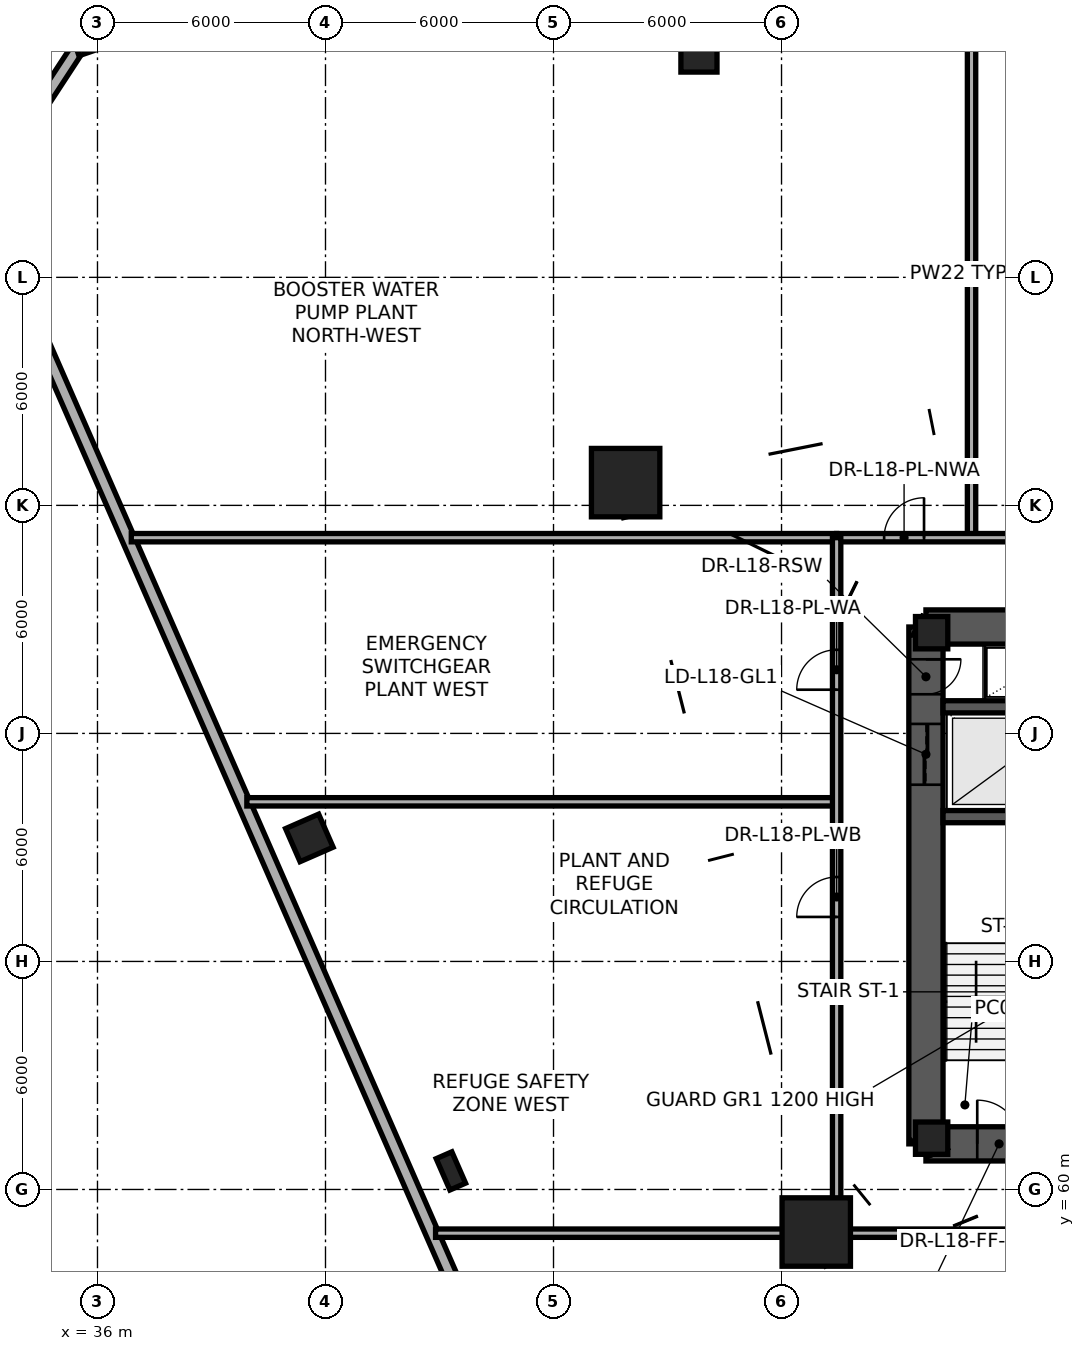
"""IFC4 building model, lengths in metres.
Left out: names, types, materials, properties, quantities, classifications, styles, units other than length and angle.
Written with IfcOpenShell. Run it as: python <this file> out.ifc"""

import sys

from ifc_helpers import new_model, si_unit, direction, frame, frame_2d, origin, origin_2d, place, context, subcontext, project, spatial, rectangle, extrude, element, fill, save


model = new_model("IFC4")
c1 = context("Model", 3, precision=1e-05, world=origin(), true_north=direction((0.0, 1.0)))
c2 = subcontext(c1, "Body", "Model", "MODEL_VIEW")
j1 = project(units=[si_unit("LENGTHUNIT", "METRE"), si_unit("PLANEANGLEUNIT", "RADIAN")], contexts=[c1])
p1 = place(None, origin())
s1 = spatial("IfcSite", under=j1, at=p1, CompositionType="ELEMENT")
p2 = place(p1, origin())
s2 = spatial("IfcBuilding", under=s1, at=p2, CompositionType="ELEMENT")
p3 = place(p2, frame((0.0, 0.0, 70.8)))
s3 = spatial("IfcBuildingStorey", under=s2, at=p3, CompositionType="ELEMENT", Elevation=70.8)
p4 = place(p3, frame((57.8, 61.2, 0.0), z_axis=(0.0, 0.0, 1.0), x_axis=(1.0, 0.0, 0.0)))
e1 = element("IfcWall", 1, at=p4, inside=s3, PredefinedType="SHEAR", context=c2, shape_type="SweptSolid", body=[
    extrude(rectangle(XDim=16.4, YDim=0.9, at=frame_2d((8.2, 0.0))), origin(), (0.0, 0.0, 1.0), 4.2),
])
p5 = place(p4, frame((1.35, 0.0, 0.0)))
e2 = element("IfcOpeningElement", 2, at=p5, cuts=e1, PredefinedType="OPENING", context=c2, shape_type="SweptSolid", body=[
    extrude(rectangle(XDim=1.15, YDim=2.15, at=frame_2d((0.575, 1.075))), frame((0.0, 0.46, 0.0), z_axis=(0.0, -1.0, 0.0), x_axis=(1.0, 0.0, 0.0)), (0.0, 0.0, 1.0), 0.92),
])
p6 = place(p4, frame((6.1, 0.0, 0.0)))
e3 = element("IfcOpeningElement", 3, at=p6, cuts=e1, PredefinedType="OPENING", context=c2, shape_type="SweptSolid", body=[
    extrude(rectangle(XDim=1.6, YDim=2.15, at=frame_2d((0.8, 1.075))), frame((0.0, 0.46, 0.0), z_axis=(0.0, -1.0, 0.0), x_axis=(1.0, 0.0, 0.0)), (0.0, 0.0, 1.0), 0.92),
])
p7 = place(p4, frame((13.55, 0.0, 0.0)))
e4 = element("IfcOpeningElement", 4, at=p7, cuts=e1, PredefinedType="OPENING", context=c2, shape_type="SweptSolid", body=[
    extrude(rectangle(XDim=1.15, YDim=2.15, at=frame_2d((0.575, 1.075))), frame((0.0, 0.46, 0.0), z_axis=(0.0, -1.0, 0.0), x_axis=(1.0, 0.0, 0.0)), (0.0, 0.0, 1.0), 0.92),
])
p8 = place(p3, frame((64.85, 74.8, 0.0), z_axis=(0.0, 0.0, 1.0), x_axis=(-1.0, 0.0, 0.0)))
e5 = element("IfcWall", 5, at=p8, inside=s3, PredefinedType="SHEAR", context=c2, shape_type="SweptSolid", body=[
    extrude(rectangle(XDim=7.05, YDim=0.9, at=frame_2d((3.525, 0.0))), origin(), (0.0, 0.0, 1.0), 4.2),
])
p9 = place(p3, frame((57.8, 74.8, 0.0), z_axis=(0.0, 0.0, 1.0), x_axis=(0.0, -1.0, 0.0)))
e6 = element("IfcWall", 6, at=p9, inside=s3, PredefinedType="SHEAR", context=c2, shape_type="SweptSolid", body=[
    extrude(rectangle(XDim=13.6, YDim=0.9, at=frame_2d((6.8, 0.0))), origin(), (0.0, 0.0, 1.0), 4.2),
])
p10 = place(p9, frame((0.85, 0.0, 0.0)))
e7 = element("IfcOpeningElement", 7, at=p10, cuts=e6, PredefinedType="OPENING", context=c2, shape_type="SweptSolid", body=[
    extrude(rectangle(XDim=0.92, YDim=2.05, at=frame_2d((0.46, 1.025))), frame((0.0, 0.46, 0.0), z_axis=(0.0, -1.0, 0.0), x_axis=(1.0, 0.0, 0.0)), (0.0, 0.0, 1.0), 0.92),
])
p11 = place(p9, frame((2.55, 0.0, 0.0)))
e8 = element("IfcOpeningElement", 8, at=p11, cuts=e6, PredefinedType="OPENING", context=c2, shape_type="SweptSolid", body=[
    extrude(rectangle(XDim=1.6, YDim=2.3, at=frame_2d((0.8, 1.15))), frame((0.0, 0.46, 0.0), z_axis=(0.0, -1.0, 0.0), x_axis=(1.0, 0.0, 0.0)), (0.0, 0.0, 1.0), 0.92),
])
for number, where, z_axis, x_axis in (
    (9, (58.25, 69.81, 0.0), (0.0, 0.0, 1.0), (1.0, 0.0, 0.0)),
    (10, (58.25, 72.7, 0.0), (0.0, 0.0, 1.0), (1.0, 0.0, 0.0)),
):
    element("IfcWall", number, at=place(p3, frame(where, z_axis=z_axis, x_axis=x_axis)), inside=s3, PredefinedType="SHEAR", context=c2, shape_type="SweptSolid", body=[
        extrude(rectangle(XDim=3.84, YDim=0.32, at=frame_2d((1.92, 0.0))), origin(), (0.0, 0.0, 1.0), 4.2),
    ])
for number, where, z_axis, x_axis in (
    (11, (57.95, 61.35, 0.0), (0.0, 0.0, 1.0), (1.0, 0.0, 0.0)),
    (12, (57.95, 74.65, 0.0), (0.0, 0.0, 1.0), (1.0, 0.0, 0.0)),
):
    element("IfcColumn", number, at=place(p3, frame(where, z_axis=z_axis, x_axis=x_axis)), inside=s3, PredefinedType="COLUMN", context=c2, shape_type="SweptSolid", body=[
        extrude(rectangle(XDim=0.85, YDim=0.85, at=origin_2d()), origin(), (0.0, 0.0, 1.0), 4.2),
    ])
for number, where, z_axis, x_axis in (
    (13, (49.898, 78.599, 0.0), (0.0, 0.0, 1.0), (1.0, 0.0, 0.0)),
    (14, (54.914, 58.88, 0.0), (0.0, 0.0, 1.0), (1.0, 0.0, 0.0)),
):
    element("IfcColumn", number, at=place(p3, frame(where, z_axis=z_axis, x_axis=x_axis)), inside=s3, PredefinedType="COLUMN", context=c2, shape_type="SweptSolid", body=[
        extrude(rectangle(XDim=1.8, YDim=1.8, at=origin_2d()), origin(), (0.0, 0.0, 1.0), 4.2),
    ])
p12 = place(p3, frame((51.778, 89.937, 0.003), z_axis=(0.023326184215, -0.02914318776, 0.999303038991), x_axis=(-0.780716755404, -0.624885067698, 0.0)))
e15 = element("IfcColumn", 15, at=p12, inside=s3, PredefinedType="COLUMN", context=c2, shape_type="SweptSolid", body=[
    extrude(rectangle(XDim=0.95, YDim=0.95, at=origin_2d()), origin(), (0.0, 0.0, 1.0), 4.197),
])
p13 = place(p3, frame((41.504, 69.261, 0.003), z_axis=(0.034091159892, -0.005003139506, 0.99940620441), x_axis=(0.964106610004, 0.263632228909, -0.03156726828)))
e16 = element("IfcColumn", 16, at=p13, inside=s3, PredefinedType="COLUMN", context=c2, shape_type="SweptSolid", body=[
    extrude(rectangle(XDim=0.95, YDim=0.95, at=origin_2d()), origin(), (0.0, 0.0, 1.0), 4.197),
])
p14 = place(p3, frame((45.241, 60.469, 0.003), z_axis=(0.027812744233, 0.00913514821, 0.999571408317), x_axis=(0.744953289823, 0.666577291136, -0.026819972481)))
e17 = element("IfcColumn", 17, at=p14, inside=s3, PredefinedType="PILASTER", context=c2, shape_type="SweptSolid", body=[
    extrude(rectangle(XDim=0.9, YDim=0.45, at=origin_2d()), origin(), (0.0, 0.0, 1.0), 4.196),
])
p15 = place(p3, frame((61.236, 21.291, 0.0), z_axis=(0.0, 0.0, 1.0), x_axis=(-0.400832536075, 0.916151340131, 0.0)))
e18 = element("IfcWall", 18, at=p15, inside=s3, PredefinedType="STANDARD", context=c2, shape_type="SweptSolid", body=[
    extrude(rectangle(XDim=68.233, YDim=0.34, at=frame_2d((34.117, 0.0))), origin(), (0.0, 0.0, 1.0), 0.85),
])
p16 = place(p3, frame((33.61, 87.167, 0.0), z_axis=(0.0, 0.0, 1.0), x_axis=(0.54736822803, 0.83689188247, 0.0)))
e19 = element("IfcWall", 19, at=p16, inside=s3, PredefinedType="STANDARD", context=c2, shape_type="SweptSolid", body=[
    extrude(rectangle(XDim=3.375, YDim=0.34, at=frame_2d((1.688, 0.0))), origin(), (0.0, 0.0, 1.0), 3.925),
])
p17 = place(p3, frame((35.458, 89.992, 0.0), z_axis=(0.0, 0.0, 1.0), x_axis=(0.945861583966, 0.324570275868, 0.0)))
e20 = element("IfcWall", 20, at=p17, inside=s3, PredefinedType="STANDARD", context=c2, shape_type="SweptSolid", body=[
    extrude(rectangle(XDim=3.375, YDim=0.34, at=frame_2d((1.688, 0.0))), origin(), (0.0, 0.0, 1.0), 3.925),
])
p18 = place(p3, frame((59.0, 77.15, 0.0), z_axis=(0.0, 0.0, 1.0), x_axis=(0.0, 1.0, 0.0)))
e21 = element("IfcWall", 21, at=p18, inside=s3, PredefinedType="PARTITIONING", context=c2, shape_type="SweptSolid", body=[
    extrude(rectangle(XDim=13.852, YDim=0.22, at=frame_2d((6.926, 0.0))), origin(), (0.0, 0.0, 1.0), 3.055),
])
p19 = place(p3, frame((36.889, 77.15, 0.0), z_axis=(0.0, 0.0, 1.0), x_axis=(1.0, 0.0, 0.0)))
e22 = element("IfcWall", 22, at=p19, inside=s3, PredefinedType="PARTITIONING", context=c2, shape_type="SweptSolid", body=[
    extrude(rectangle(XDim=18.561, YDim=0.22, at=frame_2d((9.28, 0.0))), origin(), (0.0, 0.0, 1.0), 3.055),
])
p20 = place(p3, frame((39.93, 70.2, 0.0), z_axis=(0.0, 0.0, 1.0), x_axis=(1.0, 0.0, 0.0)))
e23 = element("IfcWall", 23, at=p20, inside=s3, PredefinedType="PARTITIONING", context=c2, shape_type="SweptSolid", body=[
    extrude(rectangle(XDim=15.52, YDim=0.22, at=frame_2d((7.76, 0.0))), origin(), (0.0, 0.0, 1.0), 3.055),
])
p21 = place(p3, frame((44.896, 58.85, 0.0), z_axis=(0.0, 0.0, 1.0), x_axis=(1.0, 0.0, 0.0)))
e24 = element("IfcWall", 24, at=p21, inside=s3, PredefinedType="PARTITIONING", context=c2, shape_type="SweptSolid", body=[
    extrude(rectangle(XDim=10.554, YDim=0.22, at=frame_2d((5.277, 0.0))), origin(), (0.0, 0.0, 1.0), 3.055),
])
p22 = place(p3, frame((55.45, 58.85, 0.0), z_axis=(0.0, 0.0, 1.0), x_axis=(1.0, 0.0, 0.0)))
e25 = element("IfcWall", 25, at=p22, inside=s3, PredefinedType="PARTITIONING", context=c2, shape_type="SweptSolid", body=[
    extrude(rectangle(XDim=21.1, YDim=0.22, at=frame_2d((10.55, 0.0))), origin(), (0.0, 0.0, 1.0), 3.205),
])
p23 = place(p22, frame((9.8, 0.0, 0.0)))
e26 = element("IfcOpeningElement", 26, at=p23, cuts=e25, PredefinedType="OPENING", context=c2, shape_type="SweptSolid", body=[
    extrude(rectangle(XDim=1.5, YDim=2.2, at=frame_2d((0.75, 1.1))), frame((0.0, 0.12, 0.0), z_axis=(0.0, -1.0, 0.0), x_axis=(1.0, 0.0, 0.0)), (0.0, 0.0, 1.0), 0.24),
])
p24 = place(p3, frame((55.45, 77.15, 0.0), z_axis=(0.0, 0.0, 1.0), x_axis=(1.0, 0.0, 0.0)))
e27 = element("IfcWall", 27, at=p24, inside=s3, PredefinedType="PARTITIONING", context=c2, shape_type="SweptSolid", body=[
    extrude(rectangle(XDim=21.1, YDim=0.22, at=frame_2d((10.55, 0.0))), origin(), (0.0, 0.0, 1.0), 3.205),
])
p25 = place(p24, frame((1.25, 0.0, 0.0)))
e28 = element("IfcOpeningElement", 28, at=p25, cuts=e27, PredefinedType="OPENING", context=c2, shape_type="SweptSolid", body=[
    extrude(rectangle(XDim=1.05, YDim=2.15, at=frame_2d((0.525, 1.075))), frame((0.0, 0.12, 0.0), z_axis=(0.0, -1.0, 0.0), x_axis=(1.0, 0.0, 0.0)), (0.0, 0.0, 1.0), 0.24),
])
p26 = place(p24, frame((6.525, 0.0, 0.0)))
e29 = element("IfcOpeningElement", 29, at=p26, cuts=e27, PredefinedType="OPENING", context=c2, shape_type="SweptSolid", body=[
    extrude(rectangle(XDim=1.05, YDim=2.15, at=frame_2d((0.525, 1.075))), frame((0.0, 0.12, 0.0), z_axis=(0.0, -1.0, 0.0), x_axis=(1.0, 0.0, 0.0)), (0.0, 0.0, 1.0), 0.24),
])
p27 = place(p24, frame((11.801, 0.0, 0.0)))
e30 = element("IfcOpeningElement", 30, at=p27, cuts=e27, PredefinedType="OPENING", context=c2, shape_type="SweptSolid", body=[
    extrude(rectangle(XDim=1.05, YDim=2.15, at=frame_2d((0.525, 1.075))), frame((0.0, 0.12, 0.0), z_axis=(0.0, -1.0, 0.0), x_axis=(1.0, 0.0, 0.0)), (0.0, 0.0, 1.0), 0.24),
])
p28 = place(p24, frame((18.9, 0.0, 0.0)))
e31 = element("IfcOpeningElement", 31, at=p28, cuts=e27, PredefinedType="OPENING", context=c2, shape_type="SweptSolid", body=[
    extrude(rectangle(XDim=1.05, YDim=2.15, at=frame_2d((0.525, 1.075))), frame((0.0, 0.12, 0.0), z_axis=(0.0, -1.0, 0.0), x_axis=(1.0, 0.0, 0.0)), (0.0, 0.0, 1.0), 0.24),
])
p29 = place(p3, frame((55.45, 58.85, 0.0), z_axis=(0.0, 0.0, 1.0), x_axis=(0.0, 1.0, 0.0)))
e32 = element("IfcWall", 32, at=p29, inside=s3, PredefinedType="PARTITIONING", context=c2, shape_type="SweptSolid", body=[
    extrude(rectangle(XDim=18.3, YDim=0.22, at=frame_2d((9.15, 0.0))), origin(), (0.0, 0.0, 1.0), 3.205),
])
p30 = place(p29, frame((8.321, 0.0, 0.0)))
e33 = element("IfcOpeningElement", 33, at=p30, cuts=e32, PredefinedType="OPENING", context=c2, shape_type="SweptSolid", body=[
    extrude(rectangle(XDim=1.05, YDim=2.15, at=frame_2d((0.525, 1.075))), frame((0.0, 0.12, 0.0), z_axis=(0.0, -1.0, 0.0), x_axis=(1.0, 0.0, 0.0)), (0.0, 0.0, 1.0), 0.24),
])
p31 = place(p29, frame((14.3, 0.0, 0.0)))
e34 = element("IfcOpeningElement", 34, at=p31, cuts=e32, PredefinedType="OPENING", context=c2, shape_type="SweptSolid", body=[
    extrude(rectangle(XDim=1.05, YDim=2.15, at=frame_2d((0.525, 1.075))), frame((0.0, 0.12, 0.0), z_axis=(0.0, -1.0, 0.0), x_axis=(1.0, 0.0, 0.0)), (0.0, 0.0, 1.0), 0.24),
])
p32 = place(p5, origin())
e35 = element("IfcDoor", 35, at=p32, inside=s3, OperationType="SINGLE_SWING_LEFT", PredefinedType="DOOR", context=c2, shape_type="SweptSolid", body=[
    extrude(rectangle(XDim=1.15, YDim=2.15, at=frame_2d((0.575, 1.075))), frame((0.0, 0.025, 0.0), z_axis=(0.0, -1.0, 0.0), x_axis=(1.0, 0.0, 0.0)), (0.0, 0.0, 1.0), 0.05),
])
fill(e2, e35)
p33 = place(p10, origin())
e36 = element("IfcDoor", 36, at=p33, inside=s3, OperationType="SINGLE_SWING_LEFT", PredefinedType="DOOR", context=c2, shape_type="SweptSolid", body=[
    extrude(rectangle(XDim=0.92, YDim=2.05, at=frame_2d((0.46, 1.025))), frame((0.0, 0.025, 0.0), z_axis=(0.0, -1.0, 0.0), x_axis=(1.0, 0.0, 0.0)), (0.0, 0.0, 1.0), 0.05),
])
fill(e7, e36)
p34 = place(p11, origin())
e37 = element("IfcDoor", 37, at=p34, inside=s3, OperationType="DOUBLE_DOOR_SLIDING", PredefinedType="DOOR", context=c2, shape_type="SweptSolid", body=[
    extrude(rectangle(XDim=1.6, YDim=2.3, at=frame_2d((0.8, 1.15))), frame((0.0, 0.025, 0.0), z_axis=(0.0, -1.0, 0.0), x_axis=(1.0, 0.0, 0.0)), (0.0, 0.0, 1.0), 0.05),
])
fill(e8, e37)
p35 = place(p25, origin())
e38 = element("IfcDoor", 38, at=p35, inside=s3, OperationType="SINGLE_SWING_RIGHT", PredefinedType="DOOR", context=c2, shape_type="SweptSolid", body=[
    extrude(rectangle(XDim=1.05, YDim=2.15, at=frame_2d((0.525, 1.075))), frame((0.0, 0.025, 0.0), z_axis=(0.0, -1.0, 0.0), x_axis=(1.0, 0.0, 0.0)), (0.0, 0.0, 1.0), 0.05),
])
fill(e28, e38)
p36 = place(p30, origin())
e39 = element("IfcDoor", 39, at=p36, inside=s3, OperationType="SINGLE_SWING_LEFT", PredefinedType="DOOR", context=c2, shape_type="SweptSolid", body=[
    extrude(rectangle(XDim=1.05, YDim=2.15, at=frame_2d((0.525, 1.075))), frame((0.0, 0.025, 0.0), z_axis=(0.0, -1.0, 0.0), x_axis=(1.0, 0.0, 0.0)), (0.0, 0.0, 1.0), 0.05),
])
fill(e33, e39)
p37 = place(p31, origin())
e40 = element("IfcDoor", 40, at=p37, inside=s3, OperationType="SINGLE_SWING_LEFT", PredefinedType="DOOR", context=c2, shape_type="SweptSolid", body=[
    extrude(rectangle(XDim=1.05, YDim=2.15, at=frame_2d((0.525, 1.075))), frame((0.0, 0.025, 0.0), z_axis=(0.0, -1.0, 0.0), x_axis=(1.0, 0.0, 0.0)), (0.0, 0.0, 1.0), 0.05),
])
fill(e34, e40)
save(model, sys.argv[1])
